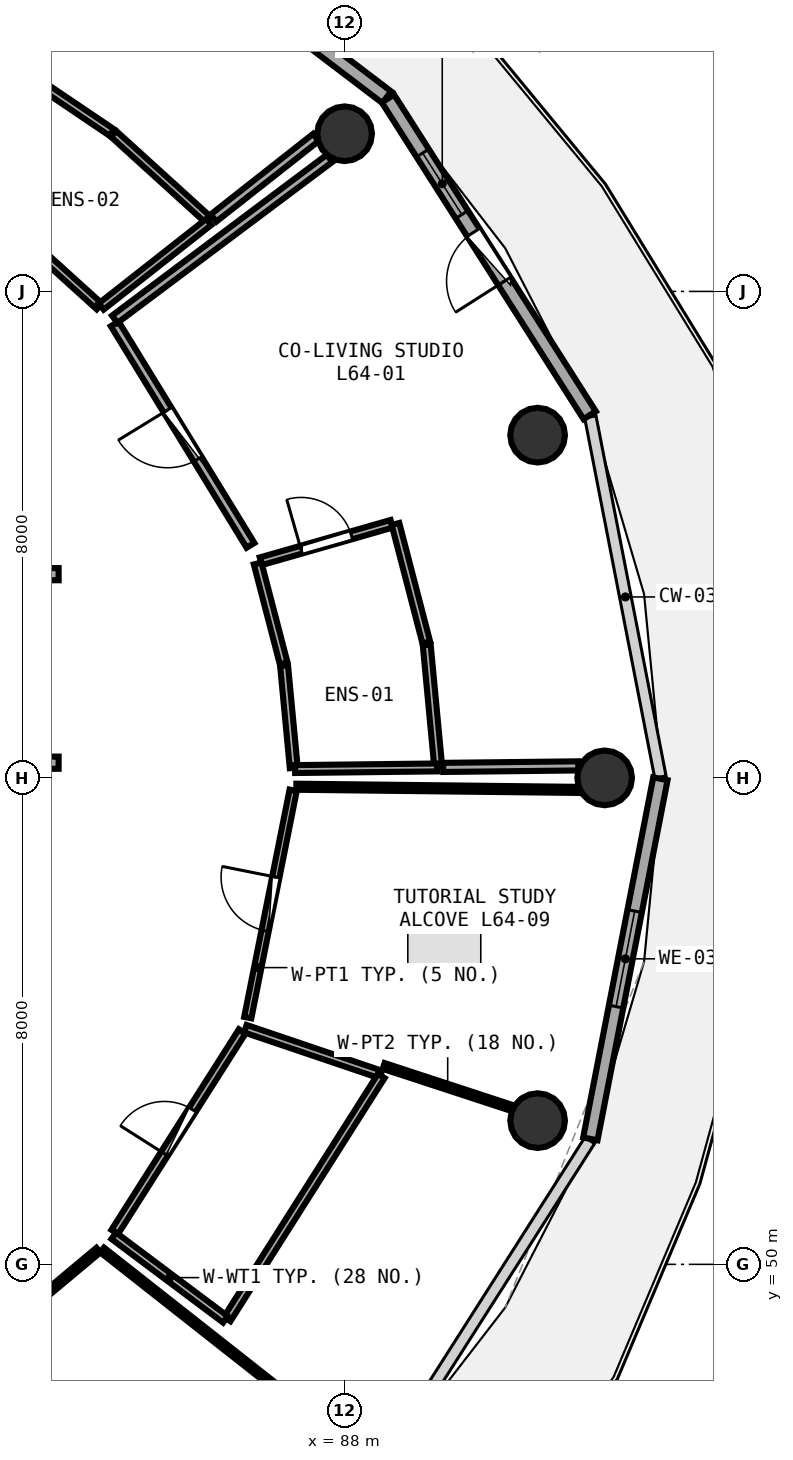
"""IFC4 building model, lengths in metres.
Left out: names, types, materials, properties, quantities, classifications, styles, units other than length and angle.
Written with IfcOpenShell. Run it as: python <this file> out.ifc"""

import sys

from ifc_helpers import new_model, si_unit, direction, frame, frame_2d, origin, origin_2d, place, context, subcontext, project, spatial, rectangle, circle, extrude, element, fill, save


model = new_model("IFC4")
c1 = context("Model", 3, precision=1e-05, world=origin(), true_north=direction((0.0, 1.0)))
c2 = subcontext(c1, "Body", "Model", "MODEL_VIEW")
j1 = project(units=[si_unit("LENGTHUNIT", "METRE"), si_unit("PLANEANGLEUNIT", "RADIAN")], contexts=[c1])
p1 = place(None, origin())
s1 = spatial("IfcSite", under=j1, at=p1, CompositionType="ELEMENT")
p2 = place(p1, origin())
s2 = spatial("IfcBuilding", under=s1, at=p2, CompositionType="ELEMENT")
p3 = place(p2, frame((0.0, 0.0, 252.45)))
s3 = spatial("IfcBuildingStorey", under=s2, at=p3, CompositionType="ELEMENT", Elevation=252.45)
for number, where, z_axis, x_axis in (
    (1, (92.28, 58.0, 0.0), (0.0, 0.0, 1.0), (1.0, 0.0, 0.0)),
    (2, (91.177, 63.636, 0.0), (0.0, 0.0, 1.0), (1.0, 0.0, 0.0)),
    (3, (88.003, 68.593, 0.0), (0.0, 0.0, 1.0), (1.0, 0.0, 0.0)),
    (4, (91.177, 52.364, 0.0), (0.0, 0.0, 1.0), (1.0, 0.0, 0.0)),
):
    element("IfcColumn", number, at=place(p3, frame(where, z_axis=z_axis, x_axis=x_axis)), inside=s3, PredefinedType="COLUMN", context=c2, shape_type="SweptSolid", body=[
        extrude(circle(Radius=0.45, at=origin_2d()), origin(), (0.0, 0.0, 1.0), 3.75),
    ])
p4 = place(p3, frame((92.034, 63.964, 0.0), z_axis=(0.0, 0.0, 1.0), x_axis=(-0.537271968456, 0.843409053728, 0.0)))
e5 = element("IfcWall", 5, at=p4, inside=s3, PredefinedType="SOLIDWALL", context=c2, shape_type="SweptSolid", body=[
    extrude(rectangle(XDim=6.175, YDim=0.24, at=frame_2d((3.087, 0.0))), origin(), (0.0, 0.0, 1.0), 3.475),
])
p5 = place(p4, frame((2.613, 0.0, 0.0)))
e6 = element("IfcOpeningElement", 6, at=p5, cuts=e5, PredefinedType="OPENING", context=c2, shape_type="SweptSolid", body=[
    extrude(rectangle(XDim=0.95, YDim=2.1, at=frame_2d((0.475, 1.05))), frame((0.0, 0.13, 0.0), z_axis=(0.0, -1.0, 0.0), x_axis=(1.0, 0.0, 0.0)), (0.0, 0.0, 1.0), 0.26),
])
p6 = place(p4, frame((3.913, 0.0, 0.85)))
e7 = element("IfcOpeningElement", 7, at=p6, cuts=e5, PredefinedType="OPENING", context=c2, shape_type="SweptSolid", body=[
    extrude(rectangle(XDim=1.2, YDim=1.45, at=frame_2d((0.6, 0.725))), frame((0.0, 0.13, 0.0), z_axis=(0.0, -1.0, 0.0), x_axis=(1.0, 0.0, 0.0)), (0.0, 0.0, 1.0), 0.26),
])
p7 = place(p3, frame((88.696, 69.194, 0.0), z_axis=(0.0, 0.0, 1.0), x_axis=(-0.796010444211, 0.605282886514, 0.0)))
e8 = element("IfcWall", 8, at=p7, inside=s3, PredefinedType="SOLIDWALL", context=c2, shape_type="SweptSolid", body=[
    extrude(rectangle(XDim=6.387, YDim=0.24, at=frame_2d((3.194, 0.0))), origin(), (0.0, 0.0, 1.0), 3.475),
])
p8 = place(p7, frame((2.719, 0.0, 0.0)))
e9 = element("IfcOpeningElement", 9, at=p8, cuts=e8, PredefinedType="OPENING", context=c2, shape_type="SweptSolid", body=[
    extrude(rectangle(XDim=0.95, YDim=2.1, at=frame_2d((0.475, 1.05))), frame((0.0, 0.13, 0.0), z_axis=(0.0, -1.0, 0.0), x_axis=(1.0, 0.0, 0.0)), (0.0, 0.0, 1.0), 0.26),
])
p9 = place(p7, frame((4.019, 0.0, 0.85)))
e10 = element("IfcOpeningElement", 10, at=p9, cuts=e8, PredefinedType="OPENING", context=c2, shape_type="SweptSolid", body=[
    extrude(rectangle(XDim=1.2, YDim=1.45, at=frame_2d((0.6, 0.725))), frame((0.0, 0.13, 0.0), z_axis=(0.0, -1.0, 0.0), x_axis=(1.0, 0.0, 0.0)), (0.0, 0.0, 1.0), 0.26),
])
p10 = place(p3, frame((92.045, 52.063, 0.0), z_axis=(0.0, 0.0, 1.0), x_axis=(0.190969309115, 0.981596008028, 0.0)))
e11 = element("IfcWall", 11, at=p10, inside=s3, PredefinedType="SOLIDWALL", context=c2, shape_type="SweptSolid", body=[
    extrude(rectangle(XDim=6.033, YDim=0.24, at=frame_2d((3.017, 0.0))), origin(), (0.0, 0.0, 1.0), 3.475),
])
p11 = place(p10, frame((2.216, 0.0, 0.85)))
e12 = element("IfcOpeningElement", 12, at=p11, cuts=e11, PredefinedType="OPENING", context=c2, shape_type="SweptSolid", body=[
    extrude(rectangle(XDim=1.6, YDim=1.45, at=frame_2d((0.8, 0.725))), frame((0.0, 0.13, 0.0), z_axis=(0.0, -1.0, 0.0), x_axis=(1.0, 0.0, 0.0)), (0.0, 0.0, 1.0), 0.26),
])
p12 = place(p3, frame((79.3, 61.35, 0.0), z_axis=(0.0, 0.0, 1.0), x_axis=(1.0, 0.0, 0.0)))
e13 = element("IfcWall", 13, at=p12, inside=s3, PredefinedType="SOLIDWALL", context=c2, shape_type="SweptSolid", body=[
    extrude(rectangle(XDim=4.0, YDim=0.2, at=frame_2d((2.0, 0.0))), origin(), (0.0, 0.0, 1.0), 2.775),
])
p13 = place(p12, frame((0.45, 0.0, 0.0)))
e14 = element("IfcOpeningElement", 14, at=p13, cuts=e13, PredefinedType="OPENING", context=c2, shape_type="SweptSolid", body=[
    extrude(rectangle(XDim=1.2, YDim=2.15, at=frame_2d((0.6, 1.075))), frame((0.0, 0.11, 0.0), z_axis=(0.0, -1.0, 0.0), x_axis=(1.0, 0.0, 0.0)), (0.0, 0.0, 1.0), 0.22),
])
p14 = place(p3, frame((79.3, 58.25, 0.0), z_axis=(0.0, 0.0, 1.0), x_axis=(1.0, 0.0, 0.0)))
e15 = element("IfcWall", 15, at=p14, inside=s3, PredefinedType="SOLIDWALL", context=c2, shape_type="SweptSolid", body=[
    extrude(rectangle(XDim=4.0, YDim=0.2, at=frame_2d((2.0, 0.0))), origin(), (0.0, 0.0, 1.0), 2.775),
])
p15 = place(p14, frame((0.5, 0.0, 0.0)))
e16 = element("IfcOpeningElement", 16, at=p15, cuts=e15, PredefinedType="OPENING", context=c2, shape_type="SweptSolid", body=[
    extrude(rectangle(XDim=1.1, YDim=2.1, at=frame_2d((0.55, 1.05))), frame((0.0, 0.11, 0.0), z_axis=(0.0, -1.0, 0.0), x_axis=(1.0, 0.0, 0.0)), (0.0, 0.0, 1.0), 0.22),
])
p16 = place(p3, frame((86.626, 61.562, 0.0), z_axis=(0.0, 0.0, 1.0), x_axis=(0.961379738838, 0.275225358117, 0.0)))
e17 = element("IfcWall", 17, at=p16, inside=s3, PredefinedType="PLUMBINGWALL", context=c2, shape_type="SweptSolid", body=[
    extrude(rectangle(XDim=2.238, YDim=0.13, at=frame_2d((1.119, 0.0))), origin(), (0.0, 0.0, 1.0), 3.175),
])
p17 = place(p16, frame((0.689, 0.0, 0.0)))
e18 = element("IfcOpeningElement", 18, at=p17, cuts=e17, PredefinedType="OPENING", context=c2, shape_type="SweptSolid", body=[
    extrude(rectangle(XDim=0.86, YDim=2.05, at=frame_2d((0.43, 1.025))), frame((0.0, 0.075, 0.0), z_axis=(0.0, -1.0, 0.0), x_axis=(1.0, 0.0, 0.0)), (0.0, 0.0, 1.0), 0.15),
])
p18 = place(p3, frame((86.456, 61.824, 0.0), z_axis=(0.0, 0.0, 1.0), x_axis=(-0.522665227064, 0.852538011128, 0.0)))
e19 = element("IfcWall", 19, at=p18, inside=s3, PredefinedType="PARTITIONING", context=c2, shape_type="SweptSolid", body=[
    extrude(rectangle(XDim=4.273, YDim=0.15, at=frame_2d((2.136, 0.0))), origin(), (0.0, 0.0, 1.0), 3.075),
])
p19 = place(p18, frame((1.661, 0.0, 0.0)))
e20 = element("IfcOpeningElement", 20, at=p19, cuts=e19, PredefinedType="OPENING", context=c2, shape_type="SweptSolid", body=[
    extrude(rectangle(XDim=0.95, YDim=2.08, at=frame_2d((0.475, 1.04))), frame((0.0, 0.085, 0.0), z_axis=(0.0, -1.0, 0.0), x_axis=(1.0, 0.0, 0.0)), (0.0, 0.0, 1.0), 0.17),
])
p20 = place(p3, frame((84.223, 50.533, 0.0), z_axis=(0.0, 0.0, 1.0), x_axis=(0.536434868975, 0.84394172272, 0.0)))
e21 = element("IfcWall", 21, at=p20, inside=s3, PredefinedType="PLUMBINGWALL", context=c2, shape_type="SweptSolid", body=[
    extrude(rectangle(XDim=3.908, YDim=0.13, at=frame_2d((1.954, 0.0))), origin(), (0.0, 0.0, 1.0), 3.075),
])
p21 = place(p20, frame((1.524, 0.0, 0.0)))
e22 = element("IfcOpeningElement", 22, at=p21, cuts=e21, PredefinedType="OPENING", context=c2, shape_type="SweptSolid", body=[
    extrude(rectangle(XDim=0.86, YDim=2.05, at=frame_2d((0.43, 1.025))), frame((0.0, 0.075, 0.0), z_axis=(0.0, -1.0, 0.0), x_axis=(1.0, 0.0, 0.0)), (0.0, 0.0, 1.0), 0.15),
])
p22 = place(p3, frame((86.411, 54.058, 0.0), z_axis=(0.0, 0.0, 1.0), x_axis=(0.195845174173, 0.980634828952, 0.0)))
e23 = element("IfcWall", 23, at=p22, inside=s3, PredefinedType="PARTITIONING", context=c2, shape_type="SweptSolid", body=[
    extrude(rectangle(XDim=3.812, YDim=0.12, at=frame_2d((1.906, 0.0))), origin(), (0.0, 0.0, 1.0), 3.48),
])
p23 = place(p22, frame((1.456, 0.0, 0.0)))
e24 = element("IfcOpeningElement", 24, at=p23, cuts=e23, PredefinedType="OPENING", context=c2, shape_type="SweptSolid", body=[
    extrude(rectangle(XDim=0.9, YDim=2.08, at=frame_2d((0.45, 1.04))), frame((0.0, 0.07, 0.0), z_axis=(0.0, -1.0, 0.0), x_axis=(1.0, 0.0, 0.0)), (0.0, 0.0, 1.0), 0.14),
])
p24 = place(p3, frame((87.167, 58.165, 0.0), z_axis=(0.0, 0.0, 1.0), x_axis=(-0.094303984979, 0.995543448784, 0.0)))
e25 = element("IfcWall", 25, at=p24, inside=s3, PredefinedType="PLUMBINGWALL", context=c2, shape_type="SweptSolid", body=[
    extrude(rectangle(XDim=1.688, YDim=0.13, at=frame_2d((0.844, 0.0))), origin(), (0.0, 0.0, 1.0), 3.075),
])
p25 = place(p3, frame((87.001, 59.885, 0.0), z_axis=(0.0, 0.0, 1.0), x_axis=(-0.252205193656, 0.967673777826, 0.0)))
e26 = element("IfcWall", 26, at=p25, inside=s3, PredefinedType="PLUMBINGWALL", context=c2, shape_type="SweptSolid", body=[
    extrude(rectangle(XDim=1.697, YDim=0.13, at=frame_2d((0.849, 0.0))), origin(), (0.0, 0.0, 1.0), 3.48),
])
p26 = place(p3, frame((88.84, 62.176, 0.0), z_axis=(0.0, 0.0, 1.0), x_axis=(0.251652018774, -0.967817783184, 0.0)))
e27 = element("IfcWall", 27, at=p26, inside=s3, PredefinedType="PLUMBINGWALL", context=c2, shape_type="SweptSolid", body=[
    extrude(rectangle(XDim=2.014, YDim=0.13, at=frame_2d((1.007, 0.0))), origin(), (0.0, 0.0, 1.0), 3.48),
])
p27 = place(p3, frame((89.354, 60.187, 0.0), z_axis=(0.0, 0.0, 1.0), x_axis=(0.09380867442, -0.995590243325, 0.0)))
e28 = element("IfcWall", 28, at=p27, inside=s3, PredefinedType="PLUMBINGWALL", context=c2, shape_type="SweptSolid", body=[
    extrude(rectangle(XDim=2.004, YDim=0.13, at=frame_2d((1.002, 0.0))), origin(), (0.0, 0.0, 1.0), 3.48),
])
p28 = place(p3, frame((89.524, 58.172, 0.0), z_axis=(0.0, 0.0, 1.0), x_axis=(-0.999935061604, -0.011396164964, 0.0)))
e29 = element("IfcWall", 29, at=p28, inside=s3, PredefinedType="PLUMBINGWALL", context=c2, shape_type="SweptSolid", body=[
    extrude(rectangle(XDim=2.335, YDim=0.13, at=frame_2d((1.167, 0.0))), origin(), (0.0, 0.0, 1.0), 3.075),
])
p29 = place(p3, frame((84.223, 65.542, 0.0), z_axis=(0.0, 0.0, 1.0), x_axis=(0.800384816546, 0.599486568191, 0.0)))
e30 = element("IfcWall", 30, at=p29, inside=s3, PredefinedType="PARTITIONING", context=c2, shape_type="SweptSolid", body=[
    extrude(rectangle(XDim=4.414, YDim=0.15, at=frame_2d((2.207, 0.0))), origin(), (0.0, 0.0, 1.0), 3.175),
])
p30 = place(p3, frame((91.848, 58.198, 0.0), z_axis=(0.0, 0.0, 1.0), x_axis=(-0.999936076373, -0.011306775263, 0.0)))
e31 = element("IfcWall", 31, at=p30, inside=s3, PredefinedType="PARTITIONING", context=c2, shape_type="SweptSolid", body=[
    extrude(rectangle(XDim=2.224, YDim=0.15, at=frame_2d((1.112, 0.0))), origin(), (0.0, 0.0, 1.0), 3.075),
])
p31 = place(p3, frame((83.97, 65.753, 0.0), z_axis=(0.0, 0.0, 1.0), x_axis=(-0.741337974143, 0.671131885767, 0.0)))
e32 = element("IfcWall", 32, at=p31, inside=s3, PredefinedType="PLUMBINGWALL", context=c2, shape_type="SweptSolid", body=[
    extrude(rectangle(XDim=1.784, YDim=0.13, at=frame_2d((0.892, 0.0))), origin(), (0.0, 0.0, 1.0), 3.075),
])
p32 = place(p3, frame((82.396, 69.815, 0.0), z_axis=(0.0, 0.0, 1.0), x_axis=(0.828761584291, -0.559601855254, 0.0)))
e33 = element("IfcWall", 33, at=p32, inside=s3, PredefinedType="PLUMBINGWALL", context=c2, shape_type="SweptSolid", body=[
    extrude(rectangle(XDim=2.145, YDim=0.13, at=frame_2d((1.073, 0.0))), origin(), (0.0, 0.0, 1.0), 3.075),
])
p33 = place(p3, frame((84.205, 68.59, 0.0), z_axis=(0.0, 0.0, 1.0), x_axis=(0.740404918602, -0.672161109043, 0.0)))
e34 = element("IfcWall", 34, at=p33, inside=s3, PredefinedType="PLUMBINGWALL", context=c2, shape_type="SweptSolid", body=[
    extrude(rectangle(XDim=2.114, YDim=0.13, at=frame_2d((1.057, 0.0))), origin(), (0.0, 0.0, 1.0), 3.075),
])
p34 = place(p3, frame((85.769, 67.143, 0.0), z_axis=(0.0, 0.0, 1.0), x_axis=(-0.786197810061, -0.617974921381, 0.0)))
e35 = element("IfcWall", 35, at=p34, inside=s3, PredefinedType="PLUMBINGWALL", context=c2, shape_type="SweptSolid", body=[
    extrude(rectangle(XDim=2.25, YDim=0.13, at=frame_2d((1.125, 0.0))), origin(), (0.0, 0.0, 1.0), 3.075),
])
p35 = place(p3, frame((87.532, 68.533, 0.0), z_axis=(0.0, 0.0, 1.0), x_axis=(-0.785832073147, -0.618439934685, 0.0)))
e36 = element("IfcWall", 36, at=p35, inside=s3, PredefinedType="PARTITIONING", context=c2, shape_type="SweptSolid", body=[
    extrude(rectangle(XDim=2.144, YDim=0.15, at=frame_2d((1.072, 0.0))), origin(), (0.0, 0.0, 1.0), 3.075),
])
p36 = place(p3, frame((81.852, 48.476, 0.0), z_axis=(0.0, 0.0, 1.0), x_axis=(0.767022676895, 0.641619991216, 0.0)))
e37 = element("IfcWall", 37, at=p36, inside=s3, PredefinedType="PARTITIONING", context=c2, shape_type="SweptSolid", body=[
    extrude(rectangle(XDim=2.741, YDim=0.1, at=frame_2d((1.371, 0.0))), origin(), (0.0, 0.0, 1.0), 3.075),
])
p37 = place(p3, frame((84.016, 50.235, 0.0), z_axis=(0.0, 0.0, 1.0), x_axis=(0.785736749878, -0.618561039745, 0.0)))
e38 = element("IfcWall", 38, at=p37, inside=s3, PredefinedType="PARTITIONING", context=c2, shape_type="SweptSolid", body=[
    extrude(rectangle(XDim=4.475, YDim=0.1, at=frame_2d((2.237, 0.0))), origin(), (0.0, 0.0, 1.0), 3.075),
])
p38 = place(p3, frame((86.371, 53.875, 0.0), z_axis=(0.0, 0.0, 1.0), x_axis=(0.947177643747, -0.320709387431, 0.0)))
e39 = element("IfcWall", 39, at=p38, inside=s3, PredefinedType="PLUMBINGWALL", context=c2, shape_type="SweptSolid", body=[
    extrude(rectangle(XDim=2.352, YDim=0.13, at=frame_2d((1.176, 0.0))), origin(), (0.0, 0.0, 1.0), 3.175),
])
p39 = place(p3, frame((88.606, 53.098, 0.0), z_axis=(0.0, 0.0, 1.0), x_axis=(-0.535433501212, -0.844577388864, 0.0)))
e40 = element("IfcWall", 40, at=p39, inside=s3, PredefinedType="PLUMBINGWALL", context=c2, shape_type="SweptSolid", body=[
    extrude(rectangle(XDim=4.735, YDim=0.13, at=frame_2d((2.368, 0.0))), origin(), (0.0, 0.0, 1.0), 3.075),
])
p40 = place(p3, frame((86.044, 49.094, 0.0), z_axis=(0.0, 0.0, 1.0), x_axis=(-0.800357274386, 0.599523338442, 0.0)))
e41 = element("IfcWall", 41, at=p40, inside=s3, PredefinedType="PLUMBINGWALL", context=c2, shape_type="SweptSolid", body=[
    extrude(rectangle(XDim=2.295, YDim=0.13, at=frame_2d((1.147, 0.0))), origin(), (0.0, 0.0, 1.0), 3.175),
])
p41 = place(p3, frame((87.209, 57.854, 0.0), z_axis=(0.0, 0.0, 1.0), x_axis=(0.999937174585, -0.01120923205, 0.0)))
e42 = element("IfcWall", 42, at=p41, inside=s3, PredefinedType="PARTITIONING", context=c2, shape_type="SweptSolid", body=[
    extrude(rectangle(XDim=4.639, YDim=0.1, at=frame_2d((2.32, 0.0))), origin(), (0.0, 0.0, 1.0), 3.075),
])
p42 = place(p3, frame((90.751, 52.573, 0.0), z_axis=(0.0, 0.0, 1.0), x_axis=(-0.950301719956, 0.311330437073, 0.0)))
e43 = element("IfcWall", 43, at=p42, inside=s3, PredefinedType="PARTITIONING", context=c2, shape_type="SweptSolid", body=[
    extrude(rectangle(XDim=2.215, YDim=0.1, at=frame_2d((1.108, 0.0))), origin(), (0.0, 0.0, 1.0), 3.235),
])
p43 = place(p5, frame((0.95, 0.0, 0.0), z_axis=(0.0, 0.0, 1.0), x_axis=(-1.0, 0.0, 0.0)))
e44 = element("IfcDoor", 44, at=p43, inside=s3, OperationType="SINGLE_SWING_RIGHT", PredefinedType="DOOR", context=c2, shape_type="SweptSolid", body=[
    extrude(rectangle(XDim=0.95, YDim=2.1, at=frame_2d((0.475, 1.05))), frame((0.0, 0.025, 0.0), z_axis=(0.0, -1.0, 0.0), x_axis=(1.0, 0.0, 0.0)), (0.0, 0.0, 1.0), 0.05),
])
fill(e6, e44)
p44 = place(p6, origin())
e45 = element("IfcWindow", 45, at=p44, inside=s3, PartitioningType="SINGLE_PANEL", PredefinedType="WINDOW", context=c2, shape_type="SweptSolid", body=[
    extrude(rectangle(XDim=1.2, YDim=1.45, at=frame_2d((0.6, 0.725))), frame((0.0, 0.03, 0.0), z_axis=(0.0, -1.0, 0.0), x_axis=(1.0, 0.0, 0.0)), (0.0, 0.0, 1.0), 0.06),
])
fill(e7, e45)
p45 = place(p11, origin())
e46 = element("IfcWindow", 46, at=p45, inside=s3, PartitioningType="SINGLE_PANEL", PredefinedType="WINDOW", context=c2, shape_type="SweptSolid", body=[
    extrude(rectangle(XDim=1.6, YDim=1.45, at=frame_2d((0.8, 0.725))), frame((0.0, 0.03, 0.0), z_axis=(0.0, -1.0, 0.0), x_axis=(1.0, 0.0, 0.0)), (0.0, 0.0, 1.0), 0.06),
])
fill(e12, e46)
p46 = place(p17, origin())
e47 = element("IfcDoor", 47, at=p46, inside=s3, OperationType="SINGLE_SWING_LEFT", PredefinedType="DOOR", context=c2, shape_type="SweptSolid", body=[
    extrude(rectangle(XDim=0.86, YDim=2.05, at=frame_2d((0.43, 1.025))), frame((0.0, 0.025, 0.0), z_axis=(0.0, -1.0, 0.0), x_axis=(1.0, 0.0, 0.0)), (0.0, 0.0, 1.0), 0.05),
])
fill(e18, e47)
p47 = place(p19, origin())
e48 = element("IfcDoor", 48, at=p47, inside=s3, OperationType="SINGLE_SWING_RIGHT", PredefinedType="DOOR", context=c2, shape_type="SweptSolid", body=[
    extrude(rectangle(XDim=0.95, YDim=2.08, at=frame_2d((0.475, 1.04))), frame((0.0, 0.025, 0.0), z_axis=(0.0, -1.0, 0.0), x_axis=(1.0, 0.0, 0.0)), (0.0, 0.0, 1.0), 0.05),
])
fill(e20, e48)
p48 = place(p21, origin())
e49 = element("IfcDoor", 49, at=p48, inside=s3, OperationType="SINGLE_SWING_LEFT", PredefinedType="DOOR", context=c2, shape_type="SweptSolid", body=[
    extrude(rectangle(XDim=0.86, YDim=2.05, at=frame_2d((0.43, 1.025))), frame((0.0, 0.025, 0.0), z_axis=(0.0, -1.0, 0.0), x_axis=(1.0, 0.0, 0.0)), (0.0, 0.0, 1.0), 0.05),
])
fill(e22, e49)
p49 = place(p23, origin())
e50 = element("IfcDoor", 50, at=p49, inside=s3, OperationType="SINGLE_SWING_RIGHT", PredefinedType="DOOR", context=c2, shape_type="SweptSolid", body=[
    extrude(rectangle(XDim=0.9, YDim=2.08, at=frame_2d((0.45, 1.04))), frame((0.0, 0.025, 0.0), z_axis=(0.0, -1.0, 0.0), x_axis=(1.0, 0.0, 0.0)), (0.0, 0.0, 1.0), 0.05),
])
fill(e24, e50)
save(model, sys.argv[1])
